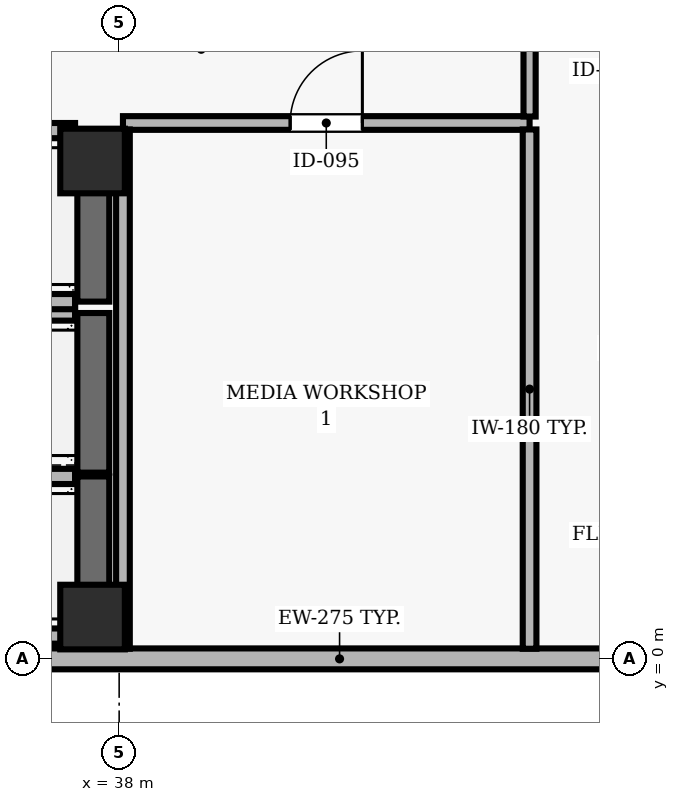
"""IFC4 building model, lengths in metres.
Left out: names, types, materials, properties, quantities, classifications, styles, units other than length and angle.
Written with IfcOpenShell. Run it as: python <this file> out.ifc"""

import sys

from ifc_helpers import new_model, si_unit, direction, frame, frame_2d, origin, origin_2d, place, context, subcontext, project, spatial, rectangle, extrude, element, fill, save


model = new_model("IFC4")
c1 = context("Model", 3, precision=1e-05, world=origin(), true_north=direction((0.0, 1.0)))
c2 = subcontext(c1, "Body", "Model", "MODEL_VIEW")
j1 = project(units=[si_unit("LENGTHUNIT", "METRE"), si_unit("PLANEANGLEUNIT", "RADIAN")], contexts=[c1])
p1 = place(None, origin())
s1 = spatial("IfcSite", under=j1, at=p1, CompositionType="ELEMENT")
p2 = place(p1, origin())
s2 = spatial("IfcBuilding", under=s1, at=p2, CompositionType="ELEMENT")
p3 = place(p2, frame((0.0, 0.0, 267.7)))
s3 = spatial("IfcBuildingStorey", under=s2, at=p3, CompositionType="ELEMENT", Elevation=267.7)
for number, where, z_axis, x_axis in (
    (1, (37.65, 0.55, 0.0), (0.0, 0.0, 1.0), (1.0, 0.0, 0.0)),
    (2, (37.65, 6.55, 0.0), (0.0, 0.0, 1.0), (1.0, 0.0, 0.0)),
):
    element("IfcColumn", number, at=place(p3, frame(where, z_axis=z_axis, x_axis=x_axis)), inside=s3, PredefinedType="COLUMN", context=c2, shape_type="SweptSolid", body=[
        extrude(rectangle(XDim=0.85, YDim=0.85, at=origin_2d()), origin(), (0.0, 0.0, 1.0), 3.9),
    ])
p4 = place(p3, frame((24.5, 0.0, 0.0), z_axis=(0.0, 0.0, 1.0), x_axis=(1.0, 0.0, 0.0)))
e3 = element("IfcWall", 3, at=p4, inside=s3, PredefinedType="SOLIDWALL", context=c2, shape_type="SweptSolid", body=[
    extrude(rectangle(XDim=32.8, YDim=0.275, at=frame_2d((16.4, 0.0))), origin(), (0.0, 0.0, 1.0), 3.69),
])
p5 = place(p4, frame((1.983, 0.0, 0.9)))
e4 = element("IfcOpeningElement", 4, at=p5, cuts=e3, PredefinedType="OPENING", context=c2, shape_type="SweptSolid", body=[
    extrude(rectangle(XDim=1.5, YDim=1.8, at=frame_2d((0.75, 0.9))), frame((0.0, 0.147, 0.0), z_axis=(0.0, -1.0, 0.0), x_axis=(1.0, 0.0, 0.0)), (0.0, 0.0, 1.0), 0.295),
])
p6 = place(p4, frame((8.35, 0.0, 0.9)))
e5 = element("IfcOpeningElement", 5, at=p6, cuts=e3, PredefinedType="OPENING", context=c2, shape_type="SweptSolid", body=[
    extrude(rectangle(XDim=1.5, YDim=1.8, at=frame_2d((0.75, 0.9))), frame((0.0, 0.147, 0.0), z_axis=(0.0, -1.0, 0.0), x_axis=(1.0, 0.0, 0.0)), (0.0, 0.0, 1.0), 0.295),
])
p7 = place(p4, frame((23.85, 0.0, 0.9)))
e6 = element("IfcOpeningElement", 6, at=p7, cuts=e3, PredefinedType="OPENING", context=c2, shape_type="SweptSolid", body=[
    extrude(rectangle(XDim=1.5, YDim=1.8, at=frame_2d((0.75, 0.9))), frame((0.0, 0.147, 0.0), z_axis=(0.0, -1.0, 0.0), x_axis=(1.0, 0.0, 0.0)), (0.0, 0.0, 1.0), 0.295),
])
p8 = place(p4, frame((29.317, 0.0, 0.9)))
e7 = element("IfcOpeningElement", 7, at=p8, cuts=e3, PredefinedType="OPENING", context=c2, shape_type="SweptSolid", body=[
    extrude(rectangle(XDim=1.5, YDim=1.8, at=frame_2d((0.75, 0.9))), frame((0.0, 0.147, 0.0), z_axis=(0.0, -1.0, 0.0), x_axis=(1.0, 0.0, 0.0)), (0.0, 0.0, 1.0), 0.295),
])
p9 = place(p3, frame((37.66, 0.3, 0.0), z_axis=(0.0, 0.0, 1.0), x_axis=(0.0, 1.0, 0.0)))
e8 = element("IfcWall", 8, at=p9, inside=s3, PredefinedType="SHEAR", context=c2, shape_type="SweptSolid", body=[
    extrude(rectangle(XDim=2.1, YDim=0.42, at=frame_2d((1.05, 0.0))), origin(), (0.0, 0.0, 1.0), 3.69),
])
for number, where, z_axis, x_axis in (
    (9, (35.28, 0.3, 0.0), (0.0, 0.0, 1.0), (1.0, 0.0, 0.0)),
    (10, (37.42, 2.4, 0.0), (0.0, 0.0, 1.0), (-1.0, 0.0, 0.0)),
):
    element("IfcWall", number, at=place(p3, frame(where, z_axis=z_axis, x_axis=x_axis)), inside=s3, PredefinedType="SOLIDWALL", context=c2, shape_type="SweptSolid", body=[
        extrude(rectangle(XDim=2.14, YDim=0.2, at=frame_2d((1.07, 0.0))), origin(), (0.0, 0.0, 1.0), 3.69),
    ])
p10 = place(p3, frame((37.66, 2.45, 0.0), z_axis=(0.0, 0.0, 1.0), x_axis=(0.0, 1.0, 0.0)))
e11 = element("IfcWall", 11, at=p10, inside=s3, PredefinedType="SHEAR", context=c2, shape_type="SweptSolid", body=[
    extrude(rectangle(XDim=2.1, YDim=0.42, at=frame_2d((1.05, 0.0))), origin(), (0.0, 0.0, 1.0), 3.69),
])
p11 = place(p3, frame((37.42, 4.55, 0.0), z_axis=(0.0, 0.0, 1.0), x_axis=(-1.0, 0.0, 0.0)))
e12 = element("IfcWall", 12, at=p11, inside=s3, PredefinedType="SOLIDWALL", context=c2, shape_type="SweptSolid", body=[
    extrude(rectangle(XDim=2.14, YDim=0.2, at=frame_2d((1.07, 0.0))), origin(), (0.0, 0.0, 1.0), 3.69),
])
p12 = place(p3, frame((37.66, 4.7, 0.0), z_axis=(0.0, 0.0, 1.0), x_axis=(0.0, 1.0, 0.0)))
e13 = element("IfcWall", 13, at=p12, inside=s3, PredefinedType="SHEAR", context=c2, shape_type="SweptSolid", body=[
    extrude(rectangle(XDim=2.25, YDim=0.42, at=frame_2d((1.125, 0.0))), origin(), (0.0, 0.0, 1.0), 3.69),
])
for number, where, z_axis, x_axis in (
    (14, (35.28, 4.7, 0.0), (0.0, 0.0, 1.0), (1.0, 0.0, 0.0)),
    (15, (37.42, 6.95, 0.0), (0.0, 0.0, 1.0), (-1.0, 0.0, 0.0)),
):
    element("IfcWall", number, at=place(p3, frame(where, z_axis=z_axis, x_axis=x_axis)), inside=s3, PredefinedType="SOLIDWALL", context=c2, shape_type="SweptSolid", body=[
        extrude(rectangle(XDim=2.14, YDim=0.2, at=frame_2d((1.07, 0.0))), origin(), (0.0, 0.0, 1.0), 3.69),
    ])
p13 = place(p3, frame((38.05, 7.05, 0.0), z_axis=(0.0, 0.0, 1.0), x_axis=(1.0, 0.0, 0.0)))
e16 = element("IfcWall", 16, at=p13, inside=s3, PredefinedType="PARTITIONING", context=c2, shape_type="SweptSolid", body=[
    extrude(rectangle(XDim=5.35, YDim=0.18, at=frame_2d((2.675, 0.0))), origin(), (0.0, 0.0, 1.0), 3.69),
])
p14 = place(p13, frame((2.2, 0.0, 0.0)))
e17 = element("IfcOpeningElement", 17, at=p14, cuts=e16, PredefinedType="OPENING", context=c2, shape_type="SweptSolid", body=[
    extrude(rectangle(XDim=0.95, YDim=2.1, at=frame_2d((0.475, 1.05))), frame((0.0, 0.1, 0.0), z_axis=(0.0, -1.0, 0.0), x_axis=(1.0, 0.0, 0.0)), (0.0, 0.0, 1.0), 0.2),
])
p15 = place(p3, frame((38.05, 6.965, 0.0), z_axis=(0.0, 0.0, 1.0), x_axis=(0.0, -1.0, 0.0)))
e18 = element("IfcWall", 18, at=p15, inside=s3, PredefinedType="PARTITIONING", context=c2, shape_type="SweptSolid", body=[
    extrude(rectangle(XDim=6.832, YDim=0.18, at=frame_2d((3.416, 0.0))), origin(), (0.0, 0.0, 1.0), 3.227),
])
p16 = place(p3, frame((43.4, 0.133, 0.0), z_axis=(0.0, 0.0, 1.0), x_axis=(0.0, 1.0, 0.0)))
e19 = element("IfcWall", 19, at=p16, inside=s3, PredefinedType="PARTITIONING", context=c2, shape_type="SweptSolid", body=[
    extrude(rectangle(XDim=6.832, YDim=0.18, at=frame_2d((3.416, 0.0))), origin(), (0.0, 0.0, 1.0), 3.69),
])
p17 = place(p3, frame((43.4, 7.135, 0.0), z_axis=(0.0, 0.0, 1.0), x_axis=(0.0, 1.0, 0.0)))
e20 = element("IfcWall", 20, at=p17, inside=s3, PredefinedType="PARTITIONING", context=c2, shape_type="SweptSolid", body=[
    extrude(rectangle(XDim=1.04, YDim=0.16, at=frame_2d((0.52, 0.0))), origin(), (0.0, 0.0, 1.0), 3.69),
])
p18 = place(p14, origin())
e21 = element("IfcDoor", 21, at=p18, inside=s3, OperationType="SINGLE_SWING_RIGHT", PredefinedType="DOOR", context=c2, shape_type="SweptSolid", body=[
    extrude(rectangle(XDim=0.95, YDim=2.1, at=frame_2d((0.475, 1.05))), frame((0.0, 0.025, 0.0), z_axis=(0.0, -1.0, 0.0), x_axis=(1.0, 0.0, 0.0)), (0.0, 0.0, 1.0), 0.05),
])
fill(e17, e21)
save(model, sys.argv[1])
